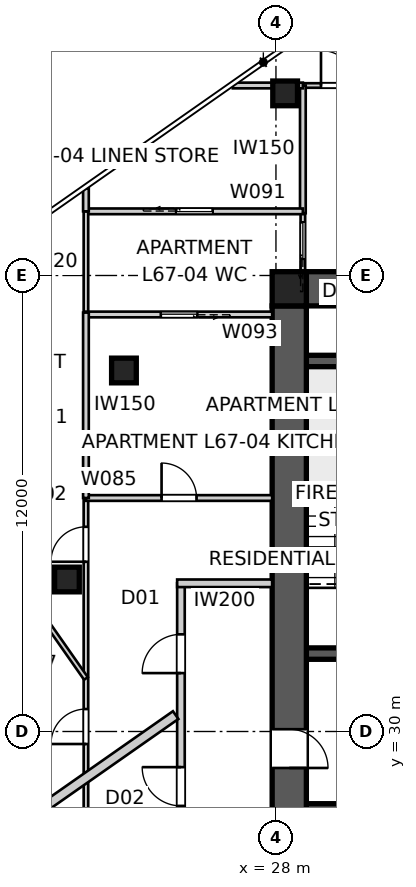
"""IFC4 building model, lengths in metres.
Left out: names, types, materials, properties, quantities, classifications, styles, units other than length and angle.
Written with IfcOpenShell. Run it as: python <this file> out.ifc"""

import sys

from ifc_helpers import new_model, si_unit, direction, frame, frame_2d, origin, origin_2d, place, context, subcontext, project, spatial, polyline, rectangle, outline, extrude, element, fill, save


model = new_model("IFC4")
c1 = context("Model", 3, precision=1e-05, world=origin(), true_north=direction((0.0, 1.0)))
c2 = subcontext(c1, "Body", "Model", "MODEL_VIEW")
j1 = project(units=[si_unit("LENGTHUNIT", "METRE"), si_unit("PLANEANGLEUNIT", "RADIAN")], contexts=[c1])
p1 = place(None, origin())
s1 = spatial("IfcSite", under=j1, at=p1, CompositionType="ELEMENT")
p2 = place(p1, origin())
s2 = spatial("IfcBuilding", under=s1, at=p2, CompositionType="ELEMENT")
p3 = place(p2, frame((0.0, 0.0, 243.8)))
s3 = spatial("IfcBuildingStorey", under=s2, at=p3, CompositionType="ELEMENT", Elevation=243.8)
p4 = place(p3, frame((28.8, 41.65, 0.0), z_axis=(0.0, 0.0, 1.0), x_axis=(1.0, 0.0, 0.0)))
e1 = element("IfcWall", 1, at=p4, inside=s3, PredefinedType="SHEAR", context=c2, shape_type="SweptSolid", body=[
    extrude(outline(polyline([(0.0, -0.45), (22.4, -0.45), (22.4, -0.025), (22.85, -0.025), (22.85, 0.025), (22.4, 0.025), (22.4, 0.45), (0.0, 0.45), (0.0, 0.025), (-0.45, 0.025), (-0.45, -0.025), (0.0, -0.025), (0.0, -0.45)])), origin(), (0.0, 0.0, 1.0), 3.4),
])
p5 = place(p3, frame((28.35, 41.2, 0.0), z_axis=(0.0, 0.0, 1.0), x_axis=(0.0, -1.0, 0.0)))
e2 = element("IfcWall", 2, at=p5, inside=s3, PredefinedType="SHEAR", context=c2, shape_type="SweptSolid", body=[
    extrude(outline(polyline([(0.0, -0.45), (22.4, -0.45), (22.4, -0.025), (22.85, -0.025), (22.85, 0.025), (22.4, 0.025), (22.4, 0.45), (0.0, 0.45), (0.0, 0.025), (-0.45, 0.025), (-0.45, -0.025), (0.0, -0.025), (0.0, -0.45)])), origin(), (0.0, 0.0, 1.0), 3.4),
])
p6 = place(p5, frame((11.14, 0.0, 0.0)))
e3 = element("IfcOpeningElement", 3, at=p6, cuts=e2, PredefinedType="OPENING", context=c2, shape_type="SweptSolid", body=[
    extrude(rectangle(XDim=1.02, YDim=2.4, at=frame_2d((0.51, 1.2))), frame((0.0, 0.46, 0.0), z_axis=(0.0, -1.0, 0.0), x_axis=(1.0, 0.0, 0.0)), (0.0, 0.0, 1.0), 0.92),
])
p7 = place(p3, frame((28.8, 32.05, 0.0), z_axis=(0.0, 0.0, 1.0), x_axis=(1.0, 0.0, 0.0)))
e4 = element("IfcWall", 4, at=p7, inside=s3, PredefinedType="SHEAR", context=c2, shape_type="SweptSolid", body=[
    extrude(rectangle(XDim=22.4, YDim=0.3, at=frame_2d((11.2, 0.0))), origin(), (0.0, 0.0, 1.0), 3.4),
])
p8 = place(p7, frame((19.04, 0.0, 0.0)))
e5 = element("IfcOpeningElement", 5, at=p8, cuts=e4, PredefinedType="OPENING", context=c2, shape_type="SweptSolid", body=[
    extrude(rectangle(XDim=0.92, YDim=2.1, at=frame_2d((0.46, 1.05))), frame((0.0, 0.16, 0.0), z_axis=(0.0, -1.0, 0.0), x_axis=(1.0, 0.0, 0.0)), (0.0, 0.0, 1.0), 0.32),
])
p9 = place(p7, frame((1.265, 0.0, 0.0)))
e6 = element("IfcOpeningElement", 6, at=p9, cuts=e4, PredefinedType="OPENING", context=c2, shape_type="SweptSolid", body=[
    extrude(rectangle(XDim=1.02, YDim=2.1, at=frame_2d((0.51, 1.05))), frame((0.0, 0.16, 0.0), z_axis=(0.0, -1.0, 0.0), x_axis=(1.0, 0.0, 0.0)), (0.0, 0.0, 1.0), 0.32),
])
p10 = place(p7, frame((4.015, 0.0, 0.0)))
e7 = element("IfcOpeningElement", 7, at=p10, cuts=e4, PredefinedType="OPENING", context=c2, shape_type="SweptSolid", body=[
    extrude(rectangle(XDim=0.92, YDim=2.1, at=frame_2d((0.46, 1.05))), frame((0.0, 0.16, 0.0), z_axis=(0.0, -1.0, 0.0), x_axis=(1.0, 0.0, 0.0)), (0.0, 0.0, 1.0), 0.32),
])
p11 = place(p7, frame((6.115, 0.0, 0.0)))
e8 = element("IfcOpeningElement", 8, at=p11, cuts=e4, PredefinedType="OPENING", context=c2, shape_type="SweptSolid", body=[
    extrude(rectangle(XDim=0.92, YDim=2.1, at=frame_2d((0.46, 1.05))), frame((0.0, 0.16, 0.0), z_axis=(0.0, -1.0, 0.0), x_axis=(1.0, 0.0, 0.0)), (0.0, 0.0, 1.0), 0.32),
])
p12 = place(p7, frame((9.79, 0.0, 0.0)))
e9 = element("IfcOpeningElement", 9, at=p12, cuts=e4, PredefinedType="OPENING", context=c2, shape_type="SweptSolid", body=[
    extrude(rectangle(XDim=0.92, YDim=2.1, at=frame_2d((0.46, 1.05))), frame((0.0, 0.16, 0.0), z_axis=(0.0, -1.0, 0.0), x_axis=(1.0, 0.0, 0.0)), (0.0, 0.0, 1.0), 0.32),
])
p13 = place(p7, frame((12.05, 0.0, 0.0)))
e10 = element("IfcOpeningElement", 10, at=p13, cuts=e4, PredefinedType="OPENING", context=c2, shape_type="SweptSolid", body=[
    extrude(rectangle(XDim=1.1, YDim=2.1, at=frame_2d((0.55, 1.05))), frame((0.0, 0.16, 0.0), z_axis=(0.0, -1.0, 0.0), x_axis=(1.0, 0.0, 0.0)), (0.0, 0.0, 1.0), 0.32),
])
p14 = place(p7, frame((14.85, 0.0, 0.0)))
e11 = element("IfcOpeningElement", 11, at=p14, cuts=e4, PredefinedType="OPENING", context=c2, shape_type="SweptSolid", body=[
    extrude(rectangle(XDim=1.1, YDim=2.1, at=frame_2d((0.55, 1.05))), frame((0.0, 0.16, 0.0), z_axis=(0.0, -1.0, 0.0), x_axis=(1.0, 0.0, 0.0)), (0.0, 0.0, 1.0), 0.32),
])
p15 = place(p3, frame((51.2, 27.95, 0.0), z_axis=(0.0, 0.0, 1.0), x_axis=(-1.0, 0.0, 0.0)))
e12 = element("IfcWall", 12, at=p15, inside=s3, PredefinedType="SHEAR", context=c2, shape_type="SweptSolid", body=[
    extrude(rectangle(XDim=22.4, YDim=0.3, at=frame_2d((11.2, 0.0))), origin(), (0.0, 0.0, 1.0), 3.4),
])
p16 = place(p15, frame((19.04, 0.0, 0.0)))
e13 = element("IfcOpeningElement", 13, at=p16, cuts=e12, PredefinedType="OPENING", context=c2, shape_type="SweptSolid", body=[
    extrude(rectangle(XDim=0.92, YDim=2.1, at=frame_2d((0.46, 1.05))), frame((0.0, 0.16, 0.0), z_axis=(0.0, -1.0, 0.0), x_axis=(1.0, 0.0, 0.0)), (0.0, 0.0, 1.0), 0.32),
])
p17 = place(p15, frame((1.265, 0.0, 0.0)))
e14 = element("IfcOpeningElement", 14, at=p17, cuts=e12, PredefinedType="OPENING", context=c2, shape_type="SweptSolid", body=[
    extrude(rectangle(XDim=1.02, YDim=2.1, at=frame_2d((0.51, 1.05))), frame((0.0, 0.16, 0.0), z_axis=(0.0, -1.0, 0.0), x_axis=(1.0, 0.0, 0.0)), (0.0, 0.0, 1.0), 0.32),
])
p18 = place(p15, frame((4.015, 0.0, 0.0)))
e15 = element("IfcOpeningElement", 15, at=p18, cuts=e12, PredefinedType="OPENING", context=c2, shape_type="SweptSolid", body=[
    extrude(rectangle(XDim=0.92, YDim=2.1, at=frame_2d((0.46, 1.05))), frame((0.0, 0.16, 0.0), z_axis=(0.0, -1.0, 0.0), x_axis=(1.0, 0.0, 0.0)), (0.0, 0.0, 1.0), 0.32),
])
p19 = place(p15, frame((9.34, 0.0, 0.0)))
e16 = element("IfcOpeningElement", 16, at=p19, cuts=e12, PredefinedType="OPENING", context=c2, shape_type="SweptSolid", body=[
    extrude(rectangle(XDim=0.92, YDim=2.1, at=frame_2d((0.46, 1.05))), frame((0.0, 0.16, 0.0), z_axis=(0.0, -1.0, 0.0), x_axis=(1.0, 0.0, 0.0)), (0.0, 0.0, 1.0), 0.32),
])
p20 = place(p15, frame((7.015, 0.0, 0.0)))
e17 = element("IfcOpeningElement", 17, at=p20, cuts=e12, PredefinedType="OPENING", context=c2, shape_type="SweptSolid", body=[
    extrude(rectangle(XDim=0.92, YDim=2.1, at=frame_2d((0.46, 1.05))), frame((0.0, 0.16, 0.0), z_axis=(0.0, -1.0, 0.0), x_axis=(1.0, 0.0, 0.0)), (0.0, 0.0, 1.0), 0.32),
])
p21 = place(p15, frame((12.05, 0.0, 0.0)))
e18 = element("IfcOpeningElement", 18, at=p21, cuts=e12, PredefinedType="OPENING", context=c2, shape_type="SweptSolid", body=[
    extrude(rectangle(XDim=1.1, YDim=2.1, at=frame_2d((0.55, 1.05))), frame((0.0, 0.16, 0.0), z_axis=(0.0, -1.0, 0.0), x_axis=(1.0, 0.0, 0.0)), (0.0, 0.0, 1.0), 0.32),
])
p22 = place(p15, frame((14.85, 0.0, 0.0)))
e19 = element("IfcOpeningElement", 19, at=p22, cuts=e12, PredefinedType="OPENING", context=c2, shape_type="SweptSolid", body=[
    extrude(rectangle(XDim=1.1, YDim=2.1, at=frame_2d((0.55, 1.05))), frame((0.0, 0.16, 0.0), z_axis=(0.0, -1.0, 0.0), x_axis=(1.0, 0.0, 0.0)), (0.0, 0.0, 1.0), 0.32),
])
p23 = place(p3, frame((28.8, 39.75, 0.0), z_axis=(0.0, 0.0, 1.0), x_axis=(1.0, 0.0, 0.0)))
e20 = element("IfcWall", 20, at=p23, inside=s3, PredefinedType="SHEAR", context=c2, shape_type="SweptSolid", body=[
    extrude(rectangle(XDim=3.5, YDim=0.3, at=frame_2d((1.75, 0.0))), origin(), (0.0, 0.0, 1.0), 3.4),
])
p24 = place(p3, frame((28.35, 41.65, 0.0), z_axis=(0.0, 0.0, 1.0), x_axis=(1.0, 0.0, 0.0)))
e21 = element("IfcColumn", 21, at=p24, inside=s3, PredefinedType="COLUMN", context=c2, shape_type="SweptSolid", body=[
    extrude(rectangle(XDim=0.9, YDim=0.9, at=origin_2d()), origin(), (0.0, 0.0, 1.0), 3.4),
])
for number, where, z_axis, x_axis in (
    (22, (28.242, 46.793, 0.0), (0.0, 0.0, 1.0), (1.0, 0.0, 0.0)),
    (23, (24.0, 39.5, 0.0), (0.0, 0.0, 1.0), (1.0, 0.0, 0.0)),
    (24, (22.5, 34.0, 0.0), (0.0, 0.0, 1.0), (1.0, 0.0, 0.0)),
):
    element("IfcColumn", number, at=place(p3, frame(where, z_axis=z_axis, x_axis=x_axis)), inside=s3, PredefinedType="COLUMN", context=c2, shape_type="SweptSolid", body=[
        extrude(rectangle(XDim=0.65, YDim=0.65, at=origin_2d()), origin(), (0.0, 0.0, 1.0), 3.4),
    ])
p25 = place(p3, frame((25.5, 26.1, 0.0), z_axis=(0.0, 0.0, 1.0), x_axis=(0.0, 1.0, 0.0)))
e25 = element("IfcWall", 25, at=p25, inside=s3, PredefinedType="PARTITIONING", context=c2, shape_type="SweptSolid", body=[
    extrude(rectangle(XDim=7.8, YDim=0.2, at=frame_2d((3.9, 0.0))), origin(), (0.0, 0.0, 1.0), 3.25),
])
p26 = place(p25, frame((1.942, 0.0, 0.0)))
e26 = element("IfcOpeningElement", 26, at=p26, cuts=e25, PredefinedType="OPENING", context=c2, shape_type="SweptSolid", body=[
    extrude(rectangle(XDim=1.02, YDim=2.34, at=frame_2d((0.51, 1.17))), frame((0.0, 0.11, 0.0), z_axis=(0.0, -1.0, 0.0), x_axis=(1.0, 0.0, 0.0)), (0.0, 0.0, 1.0), 0.22),
])
p27 = place(p25, frame((5.437, 0.0, 0.0)))
e27 = element("IfcOpeningElement", 27, at=p27, cuts=e25, PredefinedType="OPENING", context=c2, shape_type="SweptSolid", body=[
    extrude(rectangle(XDim=1.02, YDim=2.34, at=frame_2d((0.51, 1.17))), frame((0.0, 0.11, 0.0), z_axis=(0.0, -1.0, 0.0), x_axis=(1.0, 0.0, 0.0)), (0.0, 0.0, 1.0), 0.22),
])
p28 = place(p3, frame((27.9, 33.9, 0.0), z_axis=(0.0, 0.0, 1.0), x_axis=(-1.0, 0.0, 0.0)))
e28 = element("IfcWall", 28, at=p28, inside=s3, PredefinedType="PARTITIONING", context=c2, shape_type="SweptSolid", body=[
    extrude(rectangle(XDim=2.5, YDim=0.2, at=frame_2d((1.25, 0.0))), origin(), (0.0, 0.0, 1.0), 3.25),
])
p29 = place(p3, frame((17.369, 24.836, 0.0), z_axis=(0.0, 0.0, 1.0), x_axis=(0.81915902312, 0.573566469418, 0.0)))
e29 = element("IfcWall", 29, at=p29, inside=s3, PredefinedType="PARTITIONING", context=c2, shape_type="SweptSolid", body=[
    extrude(rectangle(XDim=9.756, YDim=0.25, at=frame_2d((4.878, 0.0))), origin(), (0.0, 0.0, 1.0), 3.25),
])
p30 = place(p3, frame((23.0, 16.864, 0.0), z_axis=(0.0, 0.0, 1.0), x_axis=(0.0, 1.0, 0.0)))
e30 = element("IfcWall", 30, at=p30, inside=s3, PredefinedType="PARTITIONING", context=c2, shape_type="SweptSolid", body=[
    extrude(rectangle(XDim=19.28, YDim=0.12, at=frame_2d((9.64, 0.0))), origin(), (0.0, 0.0, 1.0), 2.55),
])
p31 = place(p30, frame((9.599, 0.0, 0.0)))
e31 = element("IfcOpeningElement", 31, at=p31, cuts=e30, PredefinedType="OPENING", context=c2, shape_type="SweptSolid", body=[
    extrude(rectangle(XDim=0.92, YDim=2.34, at=frame_2d((0.46, 1.17))), frame((0.0, 0.07, 0.0), z_axis=(0.0, -1.0, 0.0), x_axis=(1.0, 0.0, 0.0)), (0.0, 0.0, 1.0), 0.14),
])
p32 = place(p30, frame((17.603, 0.0, 0.0)))
e32 = element("IfcOpeningElement", 32, at=p32, cuts=e30, PredefinedType="OPENING", context=c2, shape_type="SweptSolid", body=[
    extrude(rectangle(XDim=0.92, YDim=2.34, at=frame_2d((0.46, 1.17))), frame((0.0, 0.07, 0.0), z_axis=(0.0, -1.0, 0.0), x_axis=(1.0, 0.0, 0.0)), (0.0, 0.0, 1.0), 0.14),
])
p33 = place(p30, frame((12.806, 0.0, 0.0)))
e33 = element("IfcOpeningElement", 33, at=p33, cuts=e30, PredefinedType="OPENING", context=c2, shape_type="SweptSolid", body=[
    extrude(rectangle(XDim=0.92, YDim=2.34, at=frame_2d((0.46, 1.17))), frame((0.0, 0.07, 0.0), z_axis=(0.0, -1.0, 0.0), x_axis=(1.0, 0.0, 0.0)), (0.0, 0.0, 1.0), 0.14),
])
p34 = place(p3, frame((23.0, 36.145, 0.0), z_axis=(0.0, 0.0, 1.0), x_axis=(1.0, 0.0, 0.0)))
e34 = element("IfcWall", 34, at=p34, inside=s3, PredefinedType="SOLIDWALL", context=c2, shape_type="SweptSolid", body=[
    extrude(rectangle(XDim=4.9, YDim=0.15, at=frame_2d((2.45, 0.0))), origin(), (0.0, 0.0, 1.0), 3.25),
])
p35 = place(p34, frame((1.99, 0.0, 0.0)))
e35 = element("IfcOpeningElement", 35, at=p35, cuts=e34, PredefinedType="OPENING", context=c2, shape_type="SweptSolid", body=[
    extrude(rectangle(XDim=0.92, YDim=2.34, at=frame_2d((0.46, 1.17))), frame((0.0, 0.085, 0.0), z_axis=(0.0, -1.0, 0.0), x_axis=(1.0, 0.0, 0.0)), (0.0, 0.0, 1.0), 0.17),
])
p36 = place(p3, frame((28.708, 47.0, 0.0), z_axis=(0.0, 0.0, 1.0), x_axis=(1.0, 0.0, 0.0)))
e36 = element("IfcWall", 36, at=p36, inside=s3, PredefinedType="PARTITIONING", context=c2, shape_type="SweptSolid", body=[
    extrude(rectangle(XDim=11.346, YDim=0.12, at=frame_2d((5.673, 0.0))), origin(), (0.0, 0.0, 1.0), 2.55),
])
p37 = place(p36, frame((0.477, 0.0, 0.0)))
e37 = element("IfcOpeningElement", 37, at=p37, cuts=e36, PredefinedType="OPENING", context=c2, shape_type="SweptSolid", body=[
    extrude(rectangle(XDim=0.92, YDim=2.34, at=frame_2d((0.46, 1.17))), frame((0.0, 0.07, 0.0), z_axis=(0.0, -1.0, 0.0), x_axis=(1.0, 0.0, 0.0)), (0.0, 0.0, 1.0), 0.14),
])
p38 = place(p3, frame((28.708, 41.18, 0.0), z_axis=(0.0, 0.0, 1.0), x_axis=(0.0, 1.0, 0.0)))
e38 = element("IfcWall", 38, at=p38, inside=s3, PredefinedType="PARTITIONING", context=c2, shape_type="SweptSolid", body=[
    extrude(rectangle(XDim=2.458, YDim=0.12, at=frame_2d((1.229, 0.0))), origin(), (0.0, 0.0, 1.0), 3.25),
])
p39 = place(p38, frame((1.259, 0.0, 0.0)))
e39 = element("IfcOpeningElement", 39, at=p39, cuts=e38, PredefinedType="OPENING", context=c2, shape_type="SweptSolid", body=[
    extrude(rectangle(XDim=0.96, YDim=2.1, at=frame_2d((0.48, 1.05))), frame((0.0, 0.07, 0.0), z_axis=(0.0, -1.0, 0.0), x_axis=(1.0, 0.0, 0.0)), (0.0, 0.0, 1.0), 0.14),
])
p40 = place(p3, frame((28.708, 43.638, 0.0), z_axis=(0.0, 0.0, 1.0), x_axis=(0.0, 1.0, 0.0)))
e40 = element("IfcWall", 40, at=p40, inside=s3, PredefinedType="SOLIDWALL", context=c2, shape_type="SweptSolid", body=[
    extrude(rectangle(XDim=3.362, YDim=0.15, at=frame_2d((1.681, 0.0))), origin(), (0.0, 0.0, 1.0), 3.25),
])
p41 = place(p3, frame((23.0, 43.688, 0.0), z_axis=(0.0, 0.0, 1.0), x_axis=(1.0, 0.0, 0.0)))
e41 = element("IfcWall", 41, at=p41, inside=s3, PredefinedType="SOLIDWALL", context=c2, shape_type="SweptSolid", body=[
    extrude(rectangle(XDim=5.708, YDim=0.15, at=frame_2d((2.854, 0.0))), origin(), (0.0, 0.0, 1.0), 3.25),
])
p42 = place(p41, frame((2.374, 0.0, 0.0)))
e42 = element("IfcOpeningElement", 42, at=p42, cuts=e41, PredefinedType="OPENING", context=c2, shape_type="SweptSolid", body=[
    extrude(rectangle(XDim=0.96, YDim=2.1, at=frame_2d((0.48, 1.05))), frame((0.0, 0.085, 0.0), z_axis=(0.0, -1.0, 0.0), x_axis=(1.0, 0.0, 0.0)), (0.0, 0.0, 1.0), 0.17),
])
p43 = place(p3, frame((23.0, 41.024, 0.0), z_axis=(0.0, 0.0, 1.0), x_axis=(0.0, 1.0, 0.0)))
e43 = element("IfcWall", 43, at=p43, inside=s3, PredefinedType="PARTITIONING", context=c2, shape_type="SweptSolid", body=[
    extrude(rectangle(XDim=2.665, YDim=0.12, at=frame_2d((1.332, 0.0))), origin(), (0.0, 0.0, 1.0), 3.25),
])
p44 = place(p3, frame((27.9, 40.974, 0.0), z_axis=(0.0, 0.0, 1.0), x_axis=(-1.0, 0.0, 0.0)))
e44 = element("IfcWall", 44, at=p44, inside=s3, PredefinedType="SOLIDWALL", context=c2, shape_type="SweptSolid", body=[
    extrude(rectangle(XDim=4.9, YDim=0.15, at=frame_2d((2.45, 0.0))), origin(), (0.0, 0.0, 1.0), 3.25),
])
p45 = place(p44, frame((1.97, 0.0, 0.0)))
e45 = element("IfcOpeningElement", 45, at=p45, cuts=e44, PredefinedType="OPENING", context=c2, shape_type="SweptSolid", body=[
    extrude(rectangle(XDim=0.96, YDim=2.1, at=frame_2d((0.48, 1.05))), frame((0.0, 0.085, 0.0), z_axis=(0.0, -1.0, 0.0), x_axis=(1.0, 0.0, 0.0)), (0.0, 0.0, 1.0), 0.17),
])
p46 = place(p3, frame((23.0, 43.688, 0.0), z_axis=(0.0, 0.0, 1.0), x_axis=(0.0, 1.0, 0.0)))
e46 = element("IfcWall", 46, at=p46, inside=s3, PredefinedType="SOLIDWALL", context=c2, shape_type="SweptSolid", body=[
    extrude(rectangle(XDim=0.606, YDim=0.15, at=frame_2d((0.303, 0.0))), origin(), (0.0, 0.0, 1.0), 3.25),
])
p47 = place(p3, frame((26.864, 47.0, 0.0), z_axis=(0.0, 0.0, 1.0), x_axis=(1.0, 0.0, 0.0)))
e47 = element("IfcWall", 47, at=p47, inside=s3, PredefinedType="SOLIDWALL", context=c2, shape_type="SweptSolid", body=[
    extrude(rectangle(XDim=1.844, YDim=0.15, at=frame_2d((0.922, 0.0))), origin(), (0.0, 0.0, 1.0), 3.25),
])
p48 = place(p3, frame((23.0, 31.396, 0.0), z_axis=(0.0, 0.0, 1.0), x_axis=(-0.573575545802, 0.819152667857, 0.0)))
e48 = element("IfcWall", 48, at=p48, inside=s3, PredefinedType="PARTITIONING", context=c2, shape_type="SweptSolid", body=[
    extrude(rectangle(XDim=10.566, YDim=0.12, at=frame_2d((5.283, 0.0))), origin(), (0.0, 0.0, 1.0), 3.25),
])
p49 = place(p48, frame((3.958, 0.0, 0.0)))
e49 = element("IfcOpeningElement", 49, at=p49, cuts=e48, PredefinedType="OPENING", context=c2, shape_type="SweptSolid", body=[
    extrude(rectangle(XDim=0.92, YDim=2.34, at=frame_2d((0.46, 1.17))), frame((0.0, 0.07, 0.0), z_axis=(0.0, -1.0, 0.0), x_axis=(1.0, 0.0, 0.0)), (0.0, 0.0, 1.0), 0.14),
])
p50 = place(p48, frame((8.121, 0.0, 0.0)))
e50 = element("IfcOpeningElement", 50, at=p50, cuts=e48, PredefinedType="OPENING", context=c2, shape_type="SweptSolid", body=[
    extrude(rectangle(XDim=0.92, YDim=2.34, at=frame_2d((0.46, 1.17))), frame((0.0, 0.07, 0.0), z_axis=(0.0, -1.0, 0.0), x_axis=(1.0, 0.0, 0.0)), (0.0, 0.0, 1.0), 0.14),
])
p51 = place(p3, frame((23.0, 41.024, 0.0), z_axis=(0.0, 0.0, 1.0), x_axis=(0.0, -1.0, 0.0)))
e51 = element("IfcWall", 51, at=p51, inside=s3, PredefinedType="SOLIDWALL", context=c2, shape_type="SweptSolid", body=[
    extrude(rectangle(XDim=4.879, YDim=0.15, at=frame_2d((2.44, 0.0))), origin(), (0.0, 0.0, 1.0), 3.25),
])
p52 = place(p26, origin())
e52 = element("IfcDoor", 52, at=p52, inside=s3, OperationType="SINGLE_SWING_RIGHT", PredefinedType="DOOR", context=c2, shape_type="SweptSolid", body=[
    extrude(rectangle(XDim=1.02, YDim=2.34, at=frame_2d((0.51, 1.17))), frame((0.0, 0.025, 0.0), z_axis=(0.0, -1.0, 0.0), x_axis=(1.0, 0.0, 0.0)), (0.0, 0.0, 1.0), 0.05),
])
fill(e26, e52)
p53 = place(p27, origin())
e53 = element("IfcDoor", 53, at=p53, inside=s3, OperationType="SINGLE_SWING_LEFT", PredefinedType="DOOR", context=c2, shape_type="SweptSolid", body=[
    extrude(rectangle(XDim=1.02, YDim=2.34, at=frame_2d((0.51, 1.17))), frame((0.0, 0.025, 0.0), z_axis=(0.0, -1.0, 0.0), x_axis=(1.0, 0.0, 0.0)), (0.0, 0.0, 1.0), 0.05),
])
fill(e27, e53)
p54 = place(p35, origin())
e54 = element("IfcDoor", 54, at=p54, inside=s3, OperationType="SINGLE_SWING_LEFT", PredefinedType="DOOR", context=c2, shape_type="SweptSolid", body=[
    extrude(rectangle(XDim=0.92, YDim=2.34, at=frame_2d((0.46, 1.17))), frame((0.0, 0.025, 0.0), z_axis=(0.0, -1.0, 0.0), x_axis=(1.0, 0.0, 0.0)), (0.0, 0.0, 1.0), 0.05),
])
fill(e35, e54)
p55 = place(p32, origin())
e55 = element("IfcDoor", 55, at=p55, inside=s3, OperationType="SINGLE_SWING_LEFT", PredefinedType="DOOR", context=c2, shape_type="SweptSolid", body=[
    extrude(rectangle(XDim=0.92, YDim=2.34, at=frame_2d((0.46, 1.17))), frame((0.0, 0.025, 0.0), z_axis=(0.0, -1.0, 0.0), x_axis=(1.0, 0.0, 0.0)), (0.0, 0.0, 1.0), 0.05),
])
fill(e32, e55)
p56 = place(p33, origin())
e56 = element("IfcDoor", 56, at=p56, inside=s3, OperationType="SINGLE_SWING_LEFT", PredefinedType="DOOR", context=c2, shape_type="SweptSolid", body=[
    extrude(rectangle(XDim=0.92, YDim=2.34, at=frame_2d((0.46, 1.17))), frame((0.0, 0.025, 0.0), z_axis=(0.0, -1.0, 0.0), x_axis=(1.0, 0.0, 0.0)), (0.0, 0.0, 1.0), 0.05),
])
fill(e33, e56)
p57 = place(p45, origin())
e57 = element("IfcDoor", 57, at=p57, inside=s3, OperationType="SLIDING_TO_LEFT", PredefinedType="DOOR", context=c2, shape_type="SweptSolid", body=[
    extrude(rectangle(XDim=0.96, YDim=2.1, at=frame_2d((0.48, 1.05))), frame((0.0, 0.025, 0.0), z_axis=(0.0, -1.0, 0.0), x_axis=(1.0, 0.0, 0.0)), (0.0, 0.0, 1.0), 0.05),
])
fill(e45, e57)
p58 = place(p42, origin())
e58 = element("IfcDoor", 58, at=p58, inside=s3, OperationType="SLIDING_TO_LEFT", PredefinedType="DOOR", context=c2, shape_type="SweptSolid", body=[
    extrude(rectangle(XDim=0.96, YDim=2.1, at=frame_2d((0.48, 1.05))), frame((0.0, 0.025, 0.0), z_axis=(0.0, -1.0, 0.0), x_axis=(1.0, 0.0, 0.0)), (0.0, 0.0, 1.0), 0.05),
])
fill(e42, e58)
p59 = place(p39, origin())
e59 = element("IfcDoor", 59, at=p59, inside=s3, OperationType="SLIDING_TO_LEFT", PredefinedType="DOOR", context=c2, shape_type="SweptSolid", body=[
    extrude(rectangle(XDim=0.96, YDim=2.1, at=frame_2d((0.48, 1.05))), frame((0.0, 0.025, 0.0), z_axis=(0.0, -1.0, 0.0), x_axis=(1.0, 0.0, 0.0)), (0.0, 0.0, 1.0), 0.05),
])
fill(e39, e59)
p60 = place(p37, origin())
e60 = element("IfcDoor", 60, at=p60, inside=s3, OperationType="SINGLE_SWING_LEFT", PredefinedType="DOOR", context=c2, shape_type="SweptSolid", body=[
    extrude(rectangle(XDim=0.92, YDim=2.34, at=frame_2d((0.46, 1.17))), frame((0.0, 0.025, 0.0), z_axis=(0.0, -1.0, 0.0), x_axis=(1.0, 0.0, 0.0)), (0.0, 0.0, 1.0), 0.05),
])
fill(e37, e60)
p61 = place(p6, origin())
e61 = element("IfcDoor", 61, at=p61, inside=s3, OperationType="SINGLE_SWING_RIGHT", PredefinedType="DOOR", context=c2, shape_type="SweptSolid", body=[
    extrude(rectangle(XDim=1.02, YDim=2.4, at=frame_2d((0.51, 1.2))), frame((0.0, 0.025, 0.0), z_axis=(0.0, -1.0, 0.0), x_axis=(1.0, 0.0, 0.0)), (0.0, 0.0, 1.0), 0.05),
])
fill(e3, e61)
save(model, sys.argv[1])
